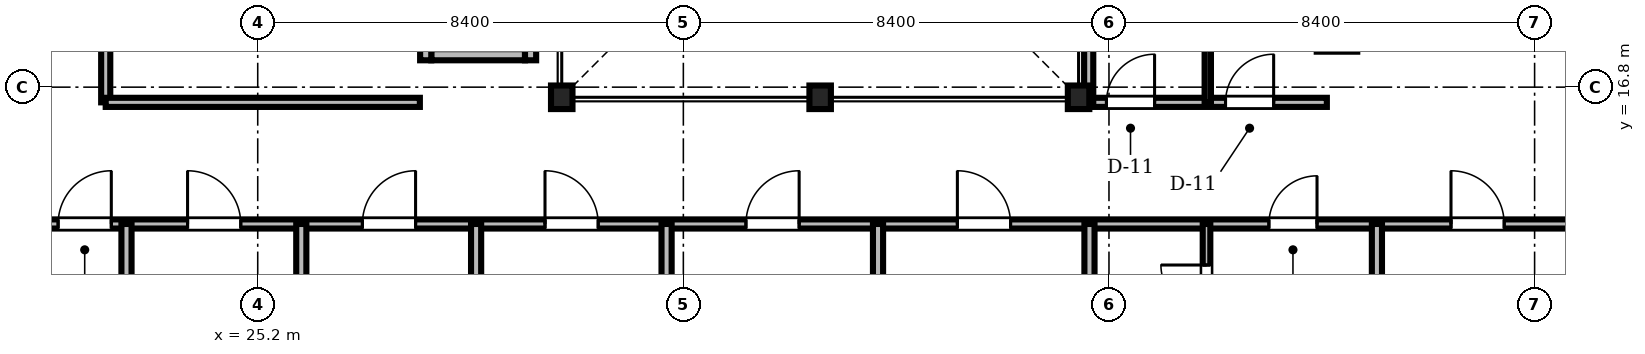
"""IFC4 building model, lengths in metres.
Left out: names, types, materials, properties, quantities, classifications, styles, units other than length and angle.
Written with IfcOpenShell. Run it as: python <this file> out.ifc"""

import sys

from ifc_helpers import new_model, si_unit, direction, frame, frame_2d, origin, origin_2d, place, context, subcontext, project, spatial, rectangle, i_section, extrude, source, transform, mapped, element, fill, save


model = new_model("IFC4")
c1 = context("Model", 3, precision=1e-05, world=origin(), true_north=direction((0.0, 1.0)))
c2 = subcontext(c1, "Body", "Model", "MODEL_VIEW")
j1 = project(units=[si_unit("LENGTHUNIT", "METRE"), si_unit("PLANEANGLEUNIT", "RADIAN")], contexts=[c1])
p1 = place(None, origin())
s1 = spatial("IfcSite", under=j1, at=p1, CompositionType="ELEMENT")
p2 = place(p1, origin())
s2 = spatial("IfcBuilding", under=s1, at=p2, CompositionType="ELEMENT")
p3 = place(p2, frame((0.0, 0.0, 126.1)))
s3 = spatial("IfcBuildingStorey", under=s2, at=p3, CompositionType="ELEMENT", Elevation=126.1)
m1 = source(origin(), c2, "Body", "SweptSolid", [
    extrude(i_section(OverallWidth=0.424, OverallDepth=0.465, WebThickness=0.035, FlangeThickness=0.056, FilletRadius=0.015, at=origin_2d()), origin(), (0.0, 0.0, 1.0), 3.46),
])
for number, where, z_axis, x_axis in (
    (1, (31.2, 16.6, 0.0), (0.0, 0.0, 1.0), (1.0, 0.0, 0.0)),
    (2, (36.3, 16.6, 0.0), (0.0, 0.0, 1.0), (1.0, 0.0, 0.0)),
    (3, (41.4, 16.6, 0.0), (0.0, 0.0, 1.0), (1.0, 0.0, 0.0)),
):
    element("IfcColumn", number, at=place(p3, frame(where, z_axis=z_axis, x_axis=x_axis)), inside=s3, PredefinedType="COLUMN", context=c2, shape_type="MappedRepresentation", body=[
        mapped(m1, transform((0.0, 0.0, 0.0), scale=1.0)),
    ])
m2 = source(origin(), c2, "Body", "SweptSolid", [
    extrude(rectangle(XDim=1.85, YDim=0.22, at=frame_2d((0.925, 0.0))), origin(), (0.0, 0.0, 1.0), 3.46),
])
p4 = place(p3, frame((28.625, 17.44, 0.0), z_axis=(0.0, 0.0, 1.0), x_axis=(1.0, 0.0, 0.0)))
e4 = element("IfcWall", 4, at=p4, inside=s3, PredefinedType="SOLIDWALL", context=c2, shape_type="MappedRepresentation", body=[
    mapped(m2, transform((0.0, 0.0, 0.0), scale=1.0)),
])
m3 = source(origin(), c2, "Body", "SweptSolid", [
    extrude(rectangle(XDim=2.54, YDim=0.22, at=frame_2d((1.27, 0.0))), origin(), (0.0, 0.0, 1.0), 3.46),
])
for number, where, z_axis, x_axis in (
    (5, (28.515, 17.33, 0.0), (0.0, 0.0, 1.0), (0.0, 1.0, 0.0)),
    (6, (30.585, 17.33, 0.0), (0.0, 0.0, 1.0), (0.0, 1.0, 0.0)),
):
    element("IfcWall", number, at=place(p3, frame(where, z_axis=z_axis, x_axis=x_axis)), inside=s3, PredefinedType="SOLIDWALL", context=c2, shape_type="MappedRepresentation", body=[
        mapped(m3, transform((0.0, 0.0, 0.0), scale=1.0)),
    ])
m4 = source(origin(), c2, "Body", "SweptSolid", [
    extrude(rectangle(XDim=46.156, YDim=0.18, at=frame_2d((23.078, 0.0))), origin(), (0.0, 0.0, 1.0), 2.702),
])
p5 = place(p3, frame((6.922, 14.1, 0.0), z_axis=(0.0, 0.0, 1.0), x_axis=(1.0, 0.0, 0.0)))
e7 = element("IfcWall", 7, at=p5, inside=s3, PredefinedType="PARTITIONING", context=c2, shape_type="MappedRepresentation", body=[
    mapped(m4, transform((0.0, 0.0, 0.0), scale=1.0)),
])
m5 = source(origin(), c2, "Body", "SweptSolid", [
    extrude(rectangle(XDim=1.05, YDim=2.2, at=frame_2d((0.525, 1.1))), frame((0.0, 0.1, 0.0), z_axis=(0.0, -1.0, 0.0), x_axis=(1.0, 0.0, 0.0)), (0.0, 0.0, 1.0), 0.2),
])
p6 = place(p5, frame((14.338, 0.0, 0.0)))
e8 = element("IfcOpeningElement", 8, at=p6, cuts=e7, PredefinedType="OPENING", context=c2, shape_type="MappedRepresentation", body=[
    mapped(m5, transform((0.0, 0.0, 0.0), scale=1.0)),
])
p7 = place(p5, frame((16.893, 0.0, 0.0)))
e9 = element("IfcOpeningElement", 9, at=p7, cuts=e7, PredefinedType="OPENING", context=c2, shape_type="MappedRepresentation", body=[
    mapped(m5, transform((0.0, 0.0, 0.0), scale=1.0)),
])
p8 = place(p5, frame((20.344, 0.0, 0.0)))
e10 = element("IfcOpeningElement", 10, at=p8, cuts=e7, PredefinedType="OPENING", context=c2, shape_type="MappedRepresentation", body=[
    mapped(m5, transform((0.0, 0.0, 0.0), scale=1.0)),
])
p9 = place(p5, frame((23.948, 0.0, 0.0)))
e11 = element("IfcOpeningElement", 11, at=p9, cuts=e7, PredefinedType="OPENING", context=c2, shape_type="MappedRepresentation", body=[
    mapped(m5, transform((0.0, 0.0, 0.0), scale=1.0)),
])
p10 = place(p5, frame((27.913, 0.0, 0.0)))
e12 = element("IfcOpeningElement", 12, at=p10, cuts=e7, PredefinedType="OPENING", context=c2, shape_type="MappedRepresentation", body=[
    mapped(m5, transform((0.0, 0.0, 0.0), scale=1.0)),
])
p11 = place(p5, frame((32.086, 0.0, 0.0)))
e13 = element("IfcOpeningElement", 13, at=p11, cuts=e7, PredefinedType="OPENING", context=c2, shape_type="MappedRepresentation", body=[
    mapped(m5, transform((0.0, 0.0, 0.0), scale=1.0)),
])
m6 = source(origin(), c2, "Body", "SweptSolid", [
    extrude(rectangle(XDim=0.95, YDim=2.15, at=frame_2d((0.475, 1.075))), frame((0.0, 0.1, 0.0), z_axis=(0.0, -1.0, 0.0), x_axis=(1.0, 0.0, 0.0)), (0.0, 0.0, 1.0), 0.2),
])
p12 = place(p5, frame((38.234, 0.0, 0.0)))
e14 = element("IfcOpeningElement", 14, at=p12, cuts=e7, PredefinedType="OPENING", context=c2, shape_type="MappedRepresentation", body=[
    mapped(m6, transform((0.0, 0.0, 0.0), scale=1.0)),
])
p13 = place(p5, frame((41.828, 0.0, 0.0)))
e15 = element("IfcOpeningElement", 15, at=p13, cuts=e7, PredefinedType="OPENING", context=c2, shape_type="MappedRepresentation", body=[
    mapped(m5, transform((0.0, 0.0, 0.0), scale=1.0)),
])
m7 = source(origin(), c2, "Body", "SweptSolid", [
    extrude(rectangle(XDim=4.7, YDim=0.18, at=frame_2d((2.35, 0.0))), origin(), (0.0, 0.0, 1.0), 2.852),
])
p14 = place(p3, frame((41.6, 16.5, 0.0), z_axis=(0.0, 0.0, 1.0), x_axis=(1.0, 0.0, 0.0)))
e16 = element("IfcWall", 16, at=p14, inside=s3, PredefinedType="PARTITIONING", context=c2, shape_type="MappedRepresentation", body=[
    mapped(m7, transform((0.0, 0.0, 0.0), scale=1.0)),
])
p15 = place(p14, frame((0.35, 0.0, 0.0)))
e17 = element("IfcOpeningElement", 17, at=p15, cuts=e16, PredefinedType="OPENING", context=c2, shape_type="MappedRepresentation", body=[
    mapped(m6, transform((0.0, 0.0, 0.0), scale=1.0)),
])
p16 = place(p14, frame((2.7, 0.0, 0.0)))
e18 = element("IfcOpeningElement", 18, at=p16, cuts=e16, PredefinedType="OPENING", context=c2, shape_type="MappedRepresentation", body=[
    mapped(m6, transform((0.0, 0.0, 0.0), scale=1.0)),
])
m8 = source(origin(), c2, "Body", "SweptSolid", [
    extrude(rectangle(XDim=3.55, YDim=0.18, at=frame_2d((1.775, 0.0))), origin(), (0.0, 0.0, 1.0), 2.852),
])
p17 = place(p3, frame((22.2, 16.5, 0.0), z_axis=(0.0, 0.0, 1.0), x_axis=(0.0, 1.0, 0.0)))
e19 = element("IfcWall", 19, at=p17, inside=s3, PredefinedType="PARTITIONING", context=c2, shape_type="MappedRepresentation", body=[
    mapped(m8, transform((0.0, 0.0, 0.0), scale=1.0)),
])
p18 = place(p17, frame((1.15, 0.0, 0.0)))
e20 = element("IfcOpeningElement", 20, at=p18, cuts=e19, PredefinedType="OPENING", context=c2, shape_type="MappedRepresentation", body=[
    mapped(m5, transform((0.0, 0.0, 0.0), scale=1.0)),
])
m9 = source(origin(), c2, "Body", "SweptSolid", [
    extrude(rectangle(XDim=2.36, YDim=0.15, at=frame_2d((1.18, 0.0))), origin(), (0.0, 0.0, 1.0), 3.122),
])
p19 = place(p3, frame((43.925, 11.74, 0.0), z_axis=(0.0, 0.0, 1.0), x_axis=(0.0, 1.0, 0.0)))
e21 = element("IfcWall", 21, at=p19, inside=s3, PredefinedType="PARTITIONING", context=c2, shape_type="MappedRepresentation", body=[
    mapped(m9, transform((0.0, 0.0, 0.0), scale=1.0)),
])
m10 = source(origin(), c2, "Body", "SweptSolid", [
    extrude(rectangle(XDim=0.9, YDim=2.1, at=frame_2d((0.45, 1.05))), frame((0.0, 0.085, 0.0), z_axis=(0.0, -1.0, 0.0), x_axis=(1.0, 0.0, 0.0)), (0.0, 0.0, 1.0), 0.17),
])
p20 = place(p19, frame((0.65, 0.0, 0.0)))
e22 = element("IfcOpeningElement", 22, at=p20, cuts=e21, PredefinedType="OPENING", context=c2, shape_type="MappedRepresentation", body=[
    mapped(m10, transform((0.0, 0.0, 0.0), scale=1.0)),
])
m11 = source(origin(), c2, "Body", "SweptSolid", [
    extrude(rectangle(XDim=11.978, YDim=0.2, at=frame_2d((5.989, 0.0))), origin(), (0.0, 0.0, 1.0), 2.702),
])
for number, where, z_axis, x_axis in (
    (23, (22.61, 2.122, 0.0), (0.0, 0.0, 1.0), (0.0, 1.0, 0.0)),
    (24, (26.06, 2.122, 0.0), (0.0, 0.0, 1.0), (0.0, 1.0, 0.0)),
):
    element("IfcWall", number, at=place(p3, frame(where, z_axis=z_axis, x_axis=x_axis)), inside=s3, PredefinedType="PARTITIONING", context=c2, shape_type="MappedRepresentation", body=[
        mapped(m11, transform((0.0, 0.0, 0.0), scale=1.0)),
    ])
m12 = source(origin(), c2, "Body", "SweptSolid", [
    extrude(rectangle(XDim=12.17, YDim=0.2, at=frame_2d((6.085, 0.0))), origin(), (0.0, 0.0, 1.0), 2.702),
])
for number, where, z_axis, x_axis in (
    (25, (29.51, 1.93, 0.0), (0.0, 0.0, 1.0), (0.0, 1.0, 0.0)),
    (26, (33.269, 1.93, 0.0), (0.0, 0.0, 1.0), (0.0, 1.0, 0.0)),
):
    element("IfcWall", number, at=place(p3, frame(where, z_axis=z_axis, x_axis=x_axis)), inside=s3, PredefinedType="PARTITIONING", context=c2, shape_type="MappedRepresentation", body=[
        mapped(m12, transform((0.0, 0.0, 0.0), scale=1.0)),
    ])
for number, where, z_axis, x_axis in (
    (27, (37.442, 2.122, 0.0), (0.0, 0.0, 1.0), (0.0, 1.0, 0.0)),
    (28, (41.615, 2.122, 0.0), (0.0, 0.0, 1.0), (0.0, 1.0, 0.0)),
    (29, (47.288, 2.122, 0.0), (0.0, 0.0, 1.0), (0.0, 1.0, 0.0)),
):
    element("IfcWall", number, at=place(p3, frame(where, z_axis=z_axis, x_axis=x_axis)), inside=s3, PredefinedType="PARTITIONING", context=c2, shape_type="MappedRepresentation", body=[
        mapped(m11, transform((0.0, 0.0, 0.0), scale=1.0)),
    ])
m13 = source(origin(), c2, "Body", "SweptSolid", [
    extrude(rectangle(XDim=7.15, YDim=0.18, at=frame_2d((3.575, 0.0))), origin(), (0.0, 0.0, 1.0), 2.852),
])
p21 = place(p3, frame((41.6, 16.5, 0.0), z_axis=(0.0, 0.0, 1.0), x_axis=(0.0, 1.0, 0.0)))
e30 = element("IfcWall", 30, at=p21, inside=s3, PredefinedType="PARTITIONING", context=c2, shape_type="MappedRepresentation", body=[
    mapped(m13, transform((0.0, 0.0, 0.0), scale=1.0)),
])
m14 = source(origin(), c2, "Body", "SweptSolid", [
    extrude(rectangle(XDim=7.15, YDim=0.125, at=frame_2d((3.575, 0.0))), origin(), (0.0, 0.0, 1.0), 2.852),
])
p22 = place(p3, frame((43.95, 16.5, 0.0), z_axis=(0.0, 0.0, 1.0), x_axis=(0.0, 1.0, 0.0)))
e31 = element("IfcWall", 31, at=p22, inside=s3, PredefinedType="PARTITIONING", context=c2, shape_type="MappedRepresentation", body=[
    mapped(m14, transform((0.0, 0.0, 0.0), scale=1.0)),
])
m15 = source(origin(), c2, "Body", "SweptSolid", [
    extrude(rectangle(XDim=6.2, YDim=0.18, at=frame_2d((3.1, 0.0))), origin(), (0.0, 0.0, 1.0), 3.46),
])
p23 = place(p3, frame((22.2, 16.5, 0.0), z_axis=(0.0, 0.0, 1.0), x_axis=(1.0, 0.0, 0.0)))
e32 = element("IfcWall", 32, at=p23, inside=s3, PredefinedType="PARTITIONING", context=c2, shape_type="MappedRepresentation", body=[
    mapped(m15, transform((0.0, 0.0, 0.0), scale=1.0)),
])
m16 = source(origin(), c2, "Body", "SweptSolid", [
    extrude(rectangle(XDim=1.05, YDim=2.2, at=frame_2d((0.525, 1.1))), frame((0.0, 0.025, 0.0), z_axis=(0.0, -1.0, 0.0), x_axis=(1.0, 0.0, 0.0)), (0.0, 0.0, 1.0), 0.05),
])
p24 = place(p6, origin())
e33 = element("IfcDoor", 33, at=p24, inside=s3, OperationType="SINGLE_SWING_RIGHT", PredefinedType="DOOR", context=c2, shape_type="MappedRepresentation", body=[
    mapped(m16, transform((0.0, 0.0, 0.0), scale=1.0)),
])
fill(e8, e33)
p25 = place(p7, origin())
e34 = element("IfcDoor", 34, at=p25, inside=s3, OperationType="SINGLE_SWING_LEFT", PredefinedType="DOOR", context=c2, shape_type="MappedRepresentation", body=[
    mapped(m16, transform((0.0, 0.0, 0.0), scale=1.0)),
])
fill(e9, e34)
p26 = place(p8, origin())
e35 = element("IfcDoor", 35, at=p26, inside=s3, OperationType="SINGLE_SWING_RIGHT", PredefinedType="DOOR", context=c2, shape_type="MappedRepresentation", body=[
    mapped(m16, transform((0.0, 0.0, 0.0), scale=1.0)),
])
fill(e10, e35)
p27 = place(p9, origin())
e36 = element("IfcDoor", 36, at=p27, inside=s3, OperationType="SINGLE_SWING_LEFT", PredefinedType="DOOR", context=c2, shape_type="MappedRepresentation", body=[
    mapped(m16, transform((0.0, 0.0, 0.0), scale=1.0)),
])
fill(e11, e36)
p28 = place(p10, origin())
e37 = element("IfcDoor", 37, at=p28, inside=s3, OperationType="SINGLE_SWING_RIGHT", PredefinedType="DOOR", context=c2, shape_type="MappedRepresentation", body=[
    mapped(m16, transform((0.0, 0.0, 0.0), scale=1.0)),
])
fill(e12, e37)
p29 = place(p11, origin())
e38 = element("IfcDoor", 38, at=p29, inside=s3, OperationType="SINGLE_SWING_LEFT", PredefinedType="DOOR", context=c2, shape_type="MappedRepresentation", body=[
    mapped(m16, transform((0.0, 0.0, 0.0), scale=1.0)),
])
fill(e13, e38)
m17 = source(origin(), c2, "Body", "SweptSolid", [
    extrude(rectangle(XDim=0.95, YDim=2.15, at=frame_2d((0.475, 1.075))), frame((0.0, 0.025, 0.0), z_axis=(0.0, -1.0, 0.0), x_axis=(1.0, 0.0, 0.0)), (0.0, 0.0, 1.0), 0.05),
])
p30 = place(p12, origin())
e39 = element("IfcDoor", 39, at=p30, inside=s3, OperationType="SINGLE_SWING_RIGHT", PredefinedType="DOOR", context=c2, shape_type="MappedRepresentation", body=[
    mapped(m17, transform((0.0, 0.0, 0.0), scale=1.0)),
])
fill(e14, e39)
p31 = place(p13, origin())
e40 = element("IfcDoor", 40, at=p31, inside=s3, OperationType="SINGLE_SWING_LEFT", PredefinedType="DOOR", context=c2, shape_type="MappedRepresentation", body=[
    mapped(m16, transform((0.0, 0.0, 0.0), scale=1.0)),
])
fill(e15, e40)
p32 = place(p15, origin())
e41 = element("IfcDoor", 41, at=p32, inside=s3, OperationType="SINGLE_SWING_RIGHT", PredefinedType="DOOR", context=c2, shape_type="MappedRepresentation", body=[
    mapped(m17, transform((0.0, 0.0, 0.0), scale=1.0)),
])
fill(e17, e41)
p33 = place(p16, origin())
e42 = element("IfcDoor", 42, at=p33, inside=s3, OperationType="SINGLE_SWING_RIGHT", PredefinedType="DOOR", context=c2, shape_type="MappedRepresentation", body=[
    mapped(m17, transform((0.0, 0.0, 0.0), scale=1.0)),
])
fill(e18, e42)
m18 = source(origin(), c2, "Body", "SweptSolid", [
    extrude(rectangle(XDim=0.9, YDim=2.1, at=frame_2d((0.45, 1.05))), frame((0.0, 0.025, 0.0), z_axis=(0.0, -1.0, 0.0), x_axis=(1.0, 0.0, 0.0)), (0.0, 0.0, 1.0), 0.05),
])
p34 = place(p20, origin())
e43 = element("IfcDoor", 43, at=p34, inside=s3, OperationType="SINGLE_SWING_RIGHT", PredefinedType="DOOR", context=c2, shape_type="MappedRepresentation", body=[
    mapped(m18, transform((0.0, 0.0, 0.0), scale=1.0)),
])
fill(e22, e43)
save(model, sys.argv[1])
